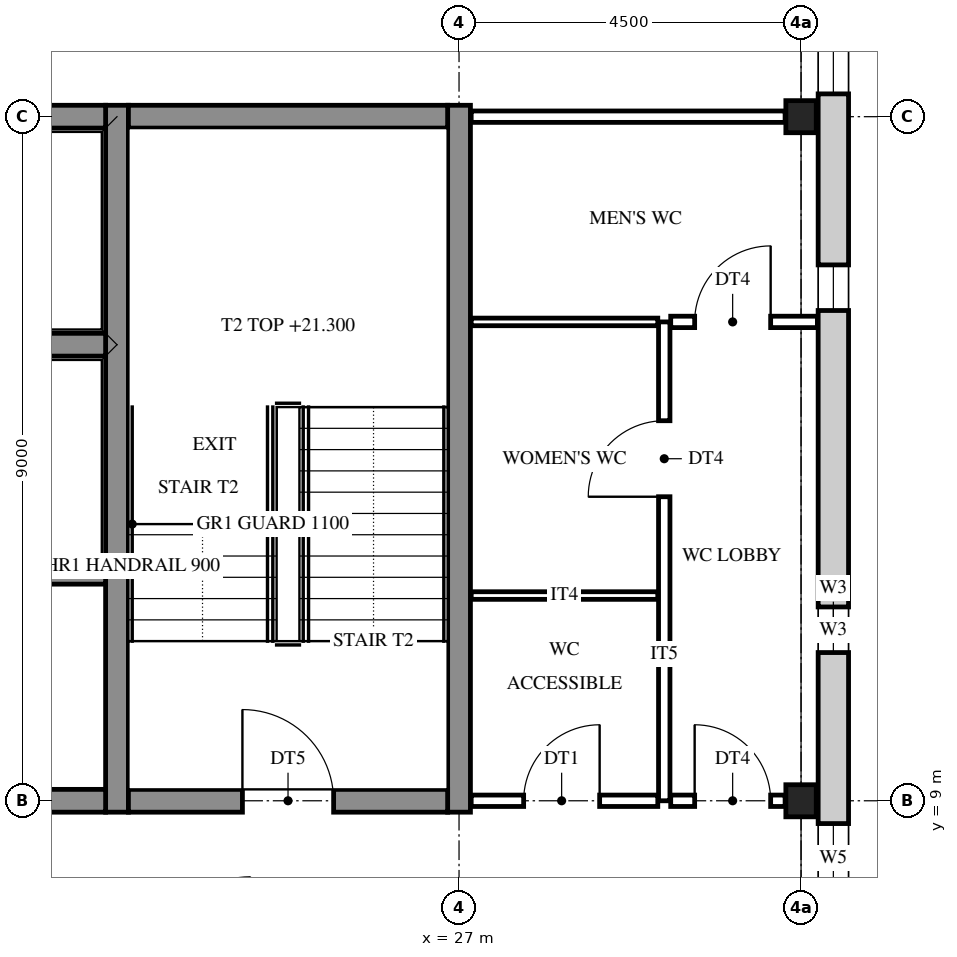
"""IFC4 building model, lengths in metres.
Left out: names, types, materials, properties, quantities, classifications, styles, units other than length and angle.
Written with IfcOpenShell. Run it as: python <this file> out.ifc"""

import sys

from ifc_helpers import new_model, si_unit, direction, frame, frame_2d, origin, origin_2d, place, context, subcontext, project, spatial, rectangle, i_section, extrude, element, fill, save


model = new_model("IFC4")
c1 = context("Model", 3, precision=1e-05, world=origin(), true_north=direction((0.0, 1.0)))
c2 = subcontext(c1, "Body", "Model", "MODEL_VIEW")
j1 = project(units=[si_unit("LENGTHUNIT", "METRE"), si_unit("PLANEANGLEUNIT", "RADIAN")], contexts=[c1])
p1 = place(None, origin())
s1 = spatial("IfcSite", under=j1, at=p1, CompositionType="ELEMENT")
p2 = place(p1, origin())
s2 = spatial("IfcBuilding", under=s1, at=p2, CompositionType="ELEMENT")
p3 = place(p2, frame((0.0, 0.0, 19.2)))
s3 = spatial("IfcBuildingStorey", under=s2, at=p3, CompositionType="ELEMENT", Elevation=19.2)
for number, where, z_axis, x_axis in (
    (1, (31.5, 9.0, 0.0), (0.0, 0.0, 1.0), (1.0, 0.0, 0.0)),
    (2, (31.5, 18.0, 0.0), (0.0, 0.0, 1.0), (1.0, 0.0, 0.0)),
):
    element("IfcColumn", number, at=place(p3, frame(where, z_axis=z_axis, x_axis=x_axis)), inside=s3, PredefinedType="COLUMN", context=c2, shape_type="SweptSolid", body=[
        extrude(i_section(OverallWidth=0.4, OverallDepth=0.422, WebThickness=0.028, FlangeThickness=0.036, at=origin_2d()), origin(), (0.0, 0.0, 1.0), 4.2),
    ])
for number, where, z_axis, x_axis in (
    (3, (22.5, 8.85, 0.0), (0.0, 0.0, 1.0), (0.0, 1.0, 0.0)),
    (4, (27.0, 8.85, 0.0), (0.0, 0.0, 1.0), (0.0, 1.0, 0.0)),
):
    element("IfcWall", number, at=place(p3, frame(where, z_axis=z_axis, x_axis=x_axis)), inside=s3, PredefinedType="SHEAR", context=c2, shape_type="SweptSolid", body=[
        extrude(rectangle(XDim=9.3, YDim=0.3, at=frame_2d((4.65, 0.0))), origin(), (0.0, 0.0, 1.0), 4.2),
    ])
p4 = place(p3, frame((19.65, 9.0, 0.0), z_axis=(0.0, 0.0, 1.0), x_axis=(1.0, 0.0, 0.0)))
e5 = element("IfcWall", 5, at=p4, inside=s3, PredefinedType="SHEAR", context=c2, shape_type="SweptSolid", body=[
    extrude(rectangle(XDim=2.7, YDim=0.3, at=frame_2d((1.35, 0.0))), origin(), (0.0, 0.0, 1.0), 4.2),
])
p5 = place(p3, frame((22.65, 9.0, 0.0), z_axis=(0.0, 0.0, 1.0), x_axis=(1.0, 0.0, 0.0)))
e6 = element("IfcWall", 6, at=p5, inside=s3, PredefinedType="SHEAR", context=c2, shape_type="SweptSolid", body=[
    extrude(rectangle(XDim=4.2, YDim=0.3, at=frame_2d((2.1, 0.0))), origin(), (0.0, 0.0, 1.0), 4.2),
])
p6 = place(p5, frame((1.5, 0.0, 0.0)))
e7 = element("IfcOpeningElement", 7, at=p6, cuts=e6, PredefinedType="OPENING", context=c2, shape_type="SweptSolid", body=[
    extrude(rectangle(XDim=1.2, YDim=2.1, at=frame_2d((0.6, 1.05))), frame((0.0, 0.16, 0.0), z_axis=(0.0, -1.0, 0.0), x_axis=(1.0, 0.0, 0.0)), (0.0, 0.0, 1.0), 0.32),
])
for number, where, z_axis, x_axis in (
    (8, (19.65, 12.0, 0.0), (0.0, 0.0, 1.0), (1.0, 0.0, 0.0)),
    (9, (19.65, 15.0, 0.0), (0.0, 0.0, 1.0), (1.0, 0.0, 0.0)),
    (10, (19.65, 18.0, 0.0), (0.0, 0.0, 1.0), (1.0, 0.0, 0.0)),
):
    element("IfcWall", number, at=place(p3, frame(where, z_axis=z_axis, x_axis=x_axis)), inside=s3, PredefinedType="SHEAR", context=c2, shape_type="SweptSolid", body=[
        extrude(rectangle(XDim=2.7, YDim=0.3, at=frame_2d((1.35, 0.0))), origin(), (0.0, 0.0, 1.0), 4.2),
    ])
p7 = place(p3, frame((22.65, 18.0, 0.0), z_axis=(0.0, 0.0, 1.0), x_axis=(1.0, 0.0, 0.0)))
e11 = element("IfcWall", 11, at=p7, inside=s3, PredefinedType="SHEAR", context=c2, shape_type="SweptSolid", body=[
    extrude(rectangle(XDim=4.2, YDim=0.3, at=frame_2d((2.1, 0.0))), origin(), (0.0, 0.0, 1.0), 4.2),
])
p8 = place(p3, frame((31.925, 27.225, 0.0), z_axis=(0.0, 0.0, 1.0), x_axis=(0.0, -1.0, 0.0)))
e12 = element("IfcWall", 12, at=p8, inside=s3, PredefinedType="STANDARD", context=c2, shape_type="SweptSolid", body=[
    extrude(rectangle(XDim=27.45, YDim=0.4, at=frame_2d((13.725, 0.0))), origin(), (0.0, 0.0, 1.0), 4.2),
])
p9 = place(p8, frame((26.025, 0.0, 0.9)))
e13 = element("IfcOpeningElement", 13, at=p9, cuts=e12, PredefinedType="OPENING", context=c2, shape_type="SweptSolid", body=[
    extrude(rectangle(XDim=0.9, YDim=2.0, at=frame_2d((0.45, 1.0))), frame((0.0, 0.21, 0.0), z_axis=(0.0, -1.0, 0.0), x_axis=(1.0, 0.0, 0.0)), (0.0, 0.0, 1.0), 0.42),
])
p10 = place(p8, frame((18.525, 0.0, 0.9)))
e14 = element("IfcOpeningElement", 14, at=p10, cuts=e12, PredefinedType="OPENING", context=c2, shape_type="SweptSolid", body=[
    extrude(rectangle(XDim=0.9, YDim=2.0, at=frame_2d((0.45, 1.0))), frame((0.0, 0.21, 0.0), z_axis=(0.0, -1.0, 0.0), x_axis=(1.0, 0.0, 0.0)), (0.0, 0.0, 1.0), 0.42),
])
p11 = place(p8, frame((15.675, 0.0, 1.6)))
e15 = element("IfcOpeningElement", 15, at=p11, cuts=e12, PredefinedType="OPENING", context=c2, shape_type="SweptSolid", body=[
    extrude(rectangle(XDim=0.6, YDim=0.9, at=frame_2d((0.3, 0.45))), frame((0.0, 0.21, 0.0), z_axis=(0.0, -1.0, 0.0), x_axis=(1.0, 0.0, 0.0)), (0.0, 0.0, 1.0), 0.42),
])
p12 = place(p8, frame((11.175, 0.0, 1.6)))
e16 = element("IfcOpeningElement", 16, at=p12, cuts=e12, PredefinedType="OPENING", context=c2, shape_type="SweptSolid", body=[
    extrude(rectangle(XDim=0.6, YDim=0.9, at=frame_2d((0.3, 0.45))), frame((0.0, 0.21, 0.0), z_axis=(0.0, -1.0, 0.0), x_axis=(1.0, 0.0, 0.0)), (0.0, 0.0, 1.0), 0.42),
])
p13 = place(p8, frame((8.025, 0.0, 0.9)))
e17 = element("IfcOpeningElement", 17, at=p13, cuts=e12, PredefinedType="OPENING", context=c2, shape_type="SweptSolid", body=[
    extrude(rectangle(XDim=0.9, YDim=2.0, at=frame_2d((0.45, 1.0))), frame((0.0, 0.21, 0.0), z_axis=(0.0, -1.0, 0.0), x_axis=(1.0, 0.0, 0.0)), (0.0, 0.0, 1.0), 0.42),
])
p14 = place(p8, frame((0.525, 0.0, 0.9)))
e18 = element("IfcOpeningElement", 18, at=p14, cuts=e12, PredefinedType="OPENING", context=c2, shape_type="SweptSolid", body=[
    extrude(rectangle(XDim=0.9, YDim=2.0, at=frame_2d((0.45, 1.0))), frame((0.0, 0.21, 0.0), z_axis=(0.0, -1.0, 0.0), x_axis=(1.0, 0.0, 0.0)), (0.0, 0.0, 1.0), 0.42),
])
p15 = place(p3, frame((29.7, 9.0, 0.0), z_axis=(0.0, 0.0, 1.0), x_axis=(0.0, 1.0, 0.0)))
e19 = element("IfcWall", 19, at=p15, inside=s3, PredefinedType="PARTITIONING", context=c2, shape_type="SweptSolid", body=[
    extrude(rectangle(XDim=6.3, YDim=0.15, at=frame_2d((3.15, 0.0))), origin(), (0.0, 0.0, 1.0), 3.537),
])
p16 = place(p15, frame((4.0, 0.0, 0.0)))
e20 = element("IfcOpeningElement", 20, at=p16, cuts=e19, PredefinedType="OPENING", context=c2, shape_type="SweptSolid", body=[
    extrude(rectangle(XDim=1.0, YDim=2.1, at=frame_2d((0.5, 1.05))), frame((0.0, 0.085, 0.0), z_axis=(0.0, -1.0, 0.0), x_axis=(1.0, 0.0, 0.0)), (0.0, 0.0, 1.0), 0.17),
])
p17 = place(p3, frame((27.16, 9.0, 0.0), z_axis=(0.0, 0.0, 1.0), x_axis=(1.0, 0.0, 0.0)))
e21 = element("IfcWall", 21, at=p17, inside=s3, PredefinedType="PARTITIONING", context=c2, shape_type="SweptSolid", body=[
    extrude(rectangle(XDim=2.455, YDim=0.15, at=frame_2d((1.228, 0.0))), origin(), (0.0, 0.0, 1.0), 3.537),
])
p18 = place(p17, frame((0.69, 0.0, 0.0)))
e22 = element("IfcOpeningElement", 22, at=p18, cuts=e21, PredefinedType="OPENING", context=c2, shape_type="SweptSolid", body=[
    extrude(rectangle(XDim=1.0, YDim=2.1, at=frame_2d((0.5, 1.05))), frame((0.0, 0.085, 0.0), z_axis=(0.0, -1.0, 0.0), x_axis=(1.0, 0.0, 0.0)), (0.0, 0.0, 1.0), 0.17),
])
p19 = place(p3, frame((29.785, 9.0, 0.0), z_axis=(0.0, 0.0, 1.0), x_axis=(1.0, 0.0, 0.0)))
e23 = element("IfcWall", 23, at=p19, inside=s3, PredefinedType="PARTITIONING", context=c2, shape_type="SweptSolid", body=[
    extrude(rectangle(XDim=1.505, YDim=0.15, at=frame_2d((0.752, 0.0))), origin(), (0.0, 0.0, 1.0), 3.537),
])
p20 = place(p19, frame((0.315, 0.0, 0.0)))
e24 = element("IfcOpeningElement", 24, at=p20, cuts=e23, PredefinedType="OPENING", context=c2, shape_type="SweptSolid", body=[
    extrude(rectangle(XDim=1.0, YDim=2.1, at=frame_2d((0.5, 1.05))), frame((0.0, 0.085, 0.0), z_axis=(0.0, -1.0, 0.0), x_axis=(1.0, 0.0, 0.0)), (0.0, 0.0, 1.0), 0.17),
])
for number, where, z_axis, x_axis in (
    (25, (27.16, 11.7, 0.0), (0.0, 0.0, 1.0), (1.0, 0.0, 0.0)),
    (26, (27.16, 15.3, 0.0), (0.0, 0.0, 1.0), (1.0, 0.0, 0.0)),
):
    element("IfcWall", number, at=place(p3, frame(where, z_axis=z_axis, x_axis=x_axis)), inside=s3, PredefinedType="PARTITIONING", context=c2, shape_type="SweptSolid", body=[
        extrude(rectangle(XDim=2.455, YDim=0.1, at=frame_2d((1.228, 0.0))), origin(), (0.0, 0.0, 1.0), 3.537),
    ])
p21 = place(p3, frame((29.785, 15.3, 0.0), z_axis=(0.0, 0.0, 1.0), x_axis=(1.0, 0.0, 0.0)))
e27 = element("IfcWall", 27, at=p21, inside=s3, PredefinedType="PARTITIONING", context=c2, shape_type="SweptSolid", body=[
    extrude(rectangle(XDim=1.93, YDim=0.15, at=frame_2d((0.965, 0.0))), origin(), (0.0, 0.0, 1.0), 3.537),
])
p22 = place(p21, frame((0.315, 0.0, 0.0)))
e28 = element("IfcOpeningElement", 28, at=p22, cuts=e27, PredefinedType="OPENING", context=c2, shape_type="SweptSolid", body=[
    extrude(rectangle(XDim=1.0, YDim=2.1, at=frame_2d((0.5, 1.05))), frame((0.0, 0.085, 0.0), z_axis=(0.0, -1.0, 0.0), x_axis=(1.0, 0.0, 0.0)), (0.0, 0.0, 1.0), 0.17),
])
p23 = place(p3, frame((27.16, 18.0, 0.0), z_axis=(0.0, 0.0, 1.0), x_axis=(1.0, 0.0, 0.0)))
e29 = element("IfcWall", 29, at=p23, inside=s3, PredefinedType="PARTITIONING", context=c2, shape_type="SweptSolid", body=[
    extrude(rectangle(XDim=4.13, YDim=0.15, at=frame_2d((2.065, 0.0))), origin(), (0.0, 0.0, 1.0), 3.537),
])
p24 = place(p10, origin())
e30 = element("IfcWindow", 30, at=p24, inside=s3, PartitioningType="SINGLE_PANEL", PredefinedType="WINDOW", context=c2, shape_type="SweptSolid", body=[
    extrude(rectangle(XDim=0.9, YDim=2.0, at=frame_2d((0.45, 1.0))), frame((0.0, 0.03, 0.0), z_axis=(0.0, -1.0, 0.0), x_axis=(1.0, 0.0, 0.0)), (0.0, 0.0, 1.0), 0.06),
])
fill(e14, e30)
p25 = place(p11, origin())
e31 = element("IfcWindow", 31, at=p25, inside=s3, PartitioningType="SINGLE_PANEL", PredefinedType="WINDOW", context=c2, shape_type="SweptSolid", body=[
    extrude(rectangle(XDim=0.6, YDim=0.9, at=frame_2d((0.3, 0.45))), frame((0.0, 0.03, 0.0), z_axis=(0.0, -1.0, 0.0), x_axis=(1.0, 0.0, 0.0)), (0.0, 0.0, 1.0), 0.06),
])
fill(e15, e31)
p26 = place(p12, origin())
e32 = element("IfcWindow", 32, at=p26, inside=s3, PartitioningType="SINGLE_PANEL", PredefinedType="WINDOW", context=c2, shape_type="SweptSolid", body=[
    extrude(rectangle(XDim=0.6, YDim=0.9, at=frame_2d((0.3, 0.45))), frame((0.0, 0.03, 0.0), z_axis=(0.0, -1.0, 0.0), x_axis=(1.0, 0.0, 0.0)), (0.0, 0.0, 1.0), 0.06),
])
fill(e16, e32)
p27 = place(p13, origin())
e33 = element("IfcWindow", 33, at=p27, inside=s3, PartitioningType="SINGLE_PANEL", PredefinedType="WINDOW", context=c2, shape_type="SweptSolid", body=[
    extrude(rectangle(XDim=0.9, YDim=2.0, at=frame_2d((0.45, 1.0))), frame((0.0, 0.03, 0.0), z_axis=(0.0, -1.0, 0.0), x_axis=(1.0, 0.0, 0.0)), (0.0, 0.0, 1.0), 0.06),
])
fill(e17, e33)
p28 = place(p6, origin())
e34 = element("IfcDoor", 34, at=p28, inside=s3, OperationType="SINGLE_SWING_LEFT", PredefinedType="DOOR", context=c2, shape_type="SweptSolid", body=[
    extrude(rectangle(XDim=1.2, YDim=2.1, at=frame_2d((0.6, 1.05))), frame((0.0, 0.025, 0.0), z_axis=(0.0, -1.0, 0.0), x_axis=(1.0, 0.0, 0.0)), (0.0, 0.0, 1.0), 0.05),
])
fill(e7, e34)
p29 = place(p18, origin())
e35 = element("IfcDoor", 35, at=p29, inside=s3, OperationType="SINGLE_SWING_RIGHT", PredefinedType="DOOR", context=c2, shape_type="SweptSolid", body=[
    extrude(rectangle(XDim=1.0, YDim=2.1, at=frame_2d((0.5, 1.05))), frame((0.0, 0.025, 0.0), z_axis=(0.0, -1.0, 0.0), x_axis=(1.0, 0.0, 0.0)), (0.0, 0.0, 1.0), 0.05),
])
fill(e22, e35)
p30 = place(p16, origin())
e36 = element("IfcDoor", 36, at=p30, inside=s3, OperationType="SINGLE_SWING_LEFT", PredefinedType="DOOR", context=c2, shape_type="SweptSolid", body=[
    extrude(rectangle(XDim=1.0, YDim=2.1, at=frame_2d((0.5, 1.05))), frame((0.0, 0.025, 0.0), z_axis=(0.0, -1.0, 0.0), x_axis=(1.0, 0.0, 0.0)), (0.0, 0.0, 1.0), 0.05),
])
fill(e20, e36)
p31 = place(p22, origin())
e37 = element("IfcDoor", 37, at=p31, inside=s3, OperationType="SINGLE_SWING_RIGHT", PredefinedType="DOOR", context=c2, shape_type="SweptSolid", body=[
    extrude(rectangle(XDim=1.0, YDim=2.1, at=frame_2d((0.5, 1.05))), frame((0.0, 0.025, 0.0), z_axis=(0.0, -1.0, 0.0), x_axis=(1.0, 0.0, 0.0)), (0.0, 0.0, 1.0), 0.05),
])
fill(e28, e37)
p32 = place(p20, origin())
e38 = element("IfcDoor", 38, at=p32, inside=s3, OperationType="SINGLE_SWING_LEFT", PredefinedType="DOOR", context=c2, shape_type="SweptSolid", body=[
    extrude(rectangle(XDim=1.0, YDim=2.1, at=frame_2d((0.5, 1.05))), frame((0.0, 0.025, 0.0), z_axis=(0.0, -1.0, 0.0), x_axis=(1.0, 0.0, 0.0)), (0.0, 0.0, 1.0), 0.05),
])
fill(e24, e38)
save(model, sys.argv[1])
